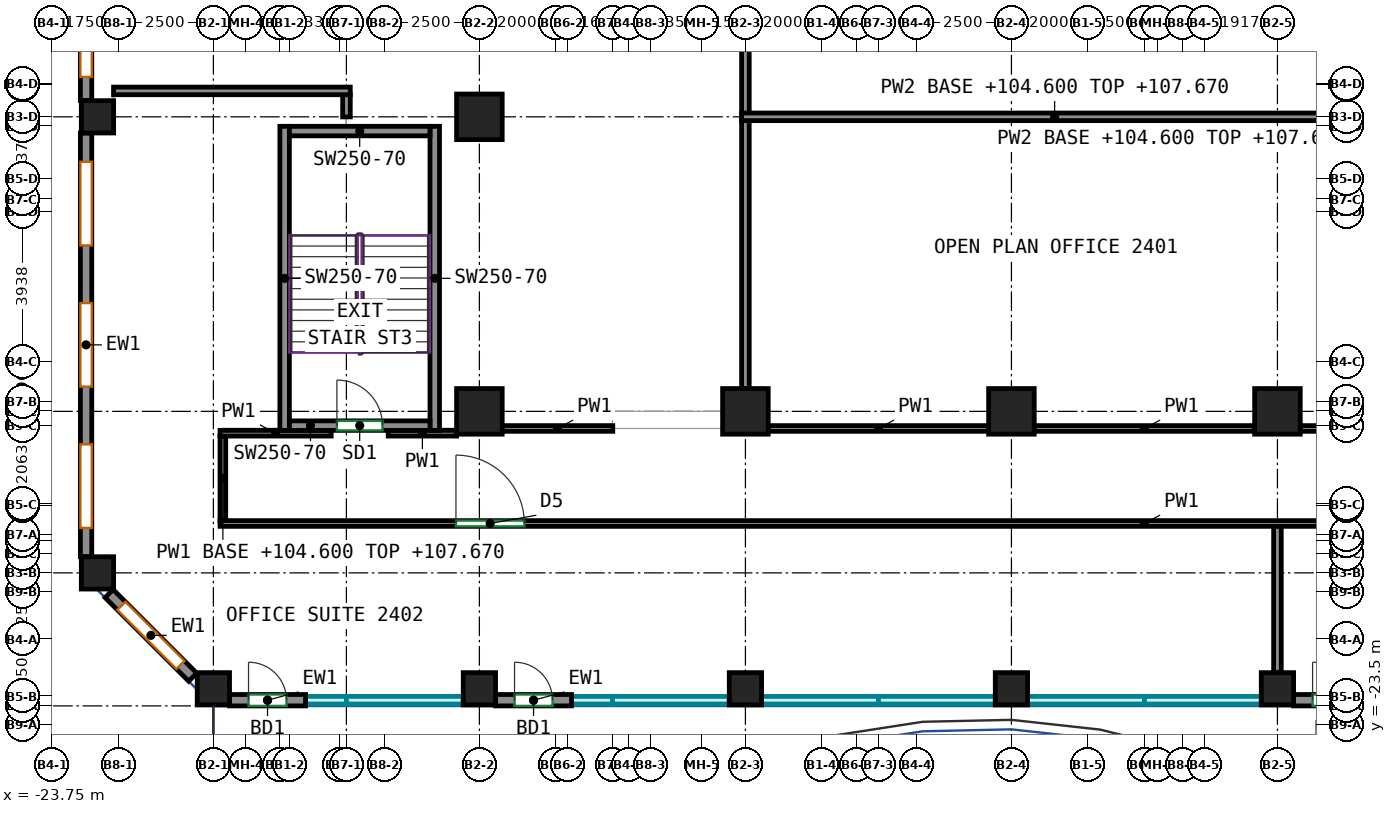
"""IFC4 building model, lengths in metres.
Left out: names, types, materials, properties, quantities, classifications, styles, units other than length and angle.
Written with IfcOpenShell. Run it as: python <this file> out.ifc"""

import sys

from ifc_helpers import new_model, si_unit, direction, frame, frame_2d, origin, origin_2d, place, context, subcontext, project, spatial, rectangle, extrude, source, transform, mapped, element, fill, save


model = new_model("IFC4")
c1 = context("Model", 3, precision=1e-05, world=origin(), true_north=direction((0.0, 1.0)))
c2 = subcontext(c1, "Body", "Model", "MODEL_VIEW")
j1 = project(units=[si_unit("LENGTHUNIT", "METRE"), si_unit("PLANEANGLEUNIT", "RADIAN")], contexts=[c1])
p1 = place(None, origin())
s1 = spatial("IfcSite", under=j1, at=p1, CompositionType="ELEMENT")
p2 = place(p1, origin())
s2 = spatial("IfcBuilding", under=s1, at=p2, CompositionType="ELEMENT")
p3 = place(p2, frame((0.0, 0.0, 104.6)))
s3 = spatial("IfcBuildingStorey", under=s2, at=p3, CompositionType="ELEMENT", Elevation=104.6)
m1 = source(origin(), c2, "Body", "SweptSolid", [
    extrude(rectangle(XDim=0.85, YDim=0.85, at=origin_2d()), origin(), (0.0, 0.0, 1.0), 3.72),
])
for number, where, z_axis, x_axis in (
    (1, (-22.55, -19.5, 0.0), (0.0, 0.0, 1.0), (1.0, 0.0, 0.0)),
    (2, (-22.55, -7.5, 0.0), (0.0, 0.0, 1.0), (1.0, 0.0, 0.0)),
    (3, (-19.5, -22.55, 0.0), (0.0, 0.0, 1.0), (1.0, 0.0, 0.0)),
    (4, (-12.5, -22.55, 0.0), (0.0, 0.0, 1.0), (1.0, 0.0, 0.0)),
):
    element("IfcColumn", number, at=place(p3, frame(where, z_axis=z_axis, x_axis=x_axis)), inside=s3, PredefinedType="COLUMN", context=c2, shape_type="MappedRepresentation", body=[
        mapped(m1, transform((0.0, 0.0, 0.0))),
    ])
m2 = source(origin(), c2, "Body", "SweptSolid", [
    extrude(rectangle(XDim=1.2, YDim=1.2, at=origin_2d()), origin(), (0.0, 0.0, 1.0), 3.72),
])
for number, where, z_axis, x_axis in (
    (5, (-12.5, -15.25, 0.0), (0.0, 0.0, 1.0), (1.0, 0.0, 0.0)),
    (6, (-12.5, -7.5, 0.0), (0.0, 0.0, 1.0), (1.0, 0.0, 0.0)),
):
    element("IfcColumn", number, at=place(p3, frame(where, z_axis=z_axis, x_axis=x_axis)), inside=s3, PredefinedType="COLUMN", context=c2, shape_type="MappedRepresentation", body=[
        mapped(m2, transform((0.0, 0.0, 0.0))),
    ])
p4 = place(p3, frame((-5.5, -22.55, 0.0), z_axis=(0.0, 0.0, 1.0), x_axis=(1.0, 0.0, 0.0)))
e7 = element("IfcColumn", 7, at=p4, inside=s3, PredefinedType="COLUMN", context=c2, shape_type="MappedRepresentation", body=[
    mapped(m1, transform((0.0, 0.0, 0.0))),
])
p5 = place(p3, frame((-5.5, -15.25, 0.0), z_axis=(0.0, 0.0, 1.0), x_axis=(1.0, 0.0, 0.0)))
e8 = element("IfcColumn", 8, at=p5, inside=s3, PredefinedType="COLUMN", context=c2, shape_type="MappedRepresentation", body=[
    mapped(m2, transform((0.0, 0.0, 0.0))),
])
p6 = place(p3, frame((1.5, -22.55, 0.0), z_axis=(0.0, 0.0, 1.0), x_axis=(1.0, 0.0, 0.0)))
e9 = element("IfcColumn", 9, at=p6, inside=s3, PredefinedType="COLUMN", context=c2, shape_type="MappedRepresentation", body=[
    mapped(m1, transform((0.0, 0.0, 0.0))),
])
p7 = place(p3, frame((1.5, -15.25, 0.0), z_axis=(0.0, 0.0, 1.0), x_axis=(1.0, 0.0, 0.0)))
e10 = element("IfcColumn", 10, at=p7, inside=s3, PredefinedType="COLUMN", context=c2, shape_type="MappedRepresentation", body=[
    mapped(m2, transform((0.0, 0.0, 0.0))),
])
p8 = place(p3, frame((8.5, -22.55, 0.0), z_axis=(0.0, 0.0, 1.0), x_axis=(1.0, 0.0, 0.0)))
e11 = element("IfcColumn", 11, at=p8, inside=s3, PredefinedType="COLUMN", context=c2, shape_type="MappedRepresentation", body=[
    mapped(m1, transform((0.0, 0.0, 0.0))),
])
p9 = place(p3, frame((8.5, -15.25, 0.0), z_axis=(0.0, 0.0, 1.0), x_axis=(1.0, 0.0, 0.0)))
e12 = element("IfcColumn", 12, at=p9, inside=s3, PredefinedType="COLUMN", context=c2, shape_type="MappedRepresentation", body=[
    mapped(m2, transform((0.0, 0.0, 0.0))),
])
m3 = source(origin(), c2, "Body", "SweptSolid", [
    extrude(rectangle(XDim=8.0, YDim=0.25, at=frame_2d((4.0, 0.0))), origin(), (0.0, 0.0, 1.0), 3.72),
])
for number, where, z_axis, x_axis in (
    (13, (-17.625, -15.75, 0.0), (0.0, 0.0, 1.0), (0.0, 1.0, 0.0)),
    (14, (-13.675, -15.75, 0.0), (0.0, 0.0, 1.0), (0.0, 1.0, 0.0)),
):
    element("IfcWall", number, at=place(p3, frame(where, z_axis=z_axis, x_axis=x_axis)), inside=s3, PredefinedType="SHEAR", context=c2, shape_type="MappedRepresentation", body=[
        mapped(m3, transform((0.0, 0.0, 0.0))),
    ])
m4 = source(origin(), c2, "Body", "SweptSolid", [
    extrude(rectangle(XDim=3.7, YDim=0.25, at=frame_2d((1.85, 0.0))), origin(), (0.0, 0.0, 1.0), 3.72),
])
p10 = place(p3, frame((-17.5, -15.625, 0.0), z_axis=(0.0, 0.0, 1.0), x_axis=(1.0, 0.0, 0.0)))
e15 = element("IfcWall", 15, at=p10, inside=s3, PredefinedType="SHEAR", context=c2, shape_type="MappedRepresentation", body=[
    mapped(m4, transform((0.0, 0.0, 0.0))),
])
p11 = place(p10, frame((1.25, 0.0, 0.0)))
e16 = element("IfcOpeningElement", 16, at=p11, cuts=e15, PredefinedType="OPENING", context=c2, shape_type="SweptSolid", body=[
    extrude(rectangle(XDim=1.2, YDim=2.1, at=frame_2d((0.6, 1.05))), frame((0.0, 0.135, 0.0), z_axis=(0.0, -1.0, 0.0), x_axis=(1.0, 0.0, 0.0)), (0.0, 0.0, 1.0), 0.27),
])
p12 = place(p3, frame((-17.5, -7.875, 0.0), z_axis=(0.0, 0.0, 1.0), x_axis=(1.0, 0.0, 0.0)))
e17 = element("IfcWall", 17, at=p12, inside=s3, PredefinedType="SHEAR", context=c2, shape_type="MappedRepresentation", body=[
    mapped(m4, transform((0.0, 0.0, 0.0))),
])
m5 = source(origin(), c2, "Body", "SweptSolid", [
    extrude(rectangle(XDim=2.0, YDim=0.3, at=frame_2d((1.0, 0.0))), origin(), (0.0, 0.0, 1.0), 3.72),
])
p13 = place(p3, frame((-19.075, -22.85, 0.0), z_axis=(0.0, 0.0, 1.0), x_axis=(1.0, 0.0, 0.0)))
e18 = element("IfcWall", 18, at=p13, inside=s3, PredefinedType="SOLIDWALL", context=c2, shape_type="MappedRepresentation", body=[
    mapped(m5, transform((0.0, 0.0, 0.0))),
])
p14 = place(p13, frame((0.5, 0.0, 0.0)))
e19 = element("IfcOpeningElement", 19, at=p14, cuts=e18, PredefinedType="OPENING", context=c2, shape_type="SweptSolid", body=[
    extrude(rectangle(XDim=1.0, YDim=2.1, at=frame_2d((0.5, 1.05))), frame((0.0, 0.16, 0.0), z_axis=(0.0, -1.0, 0.0), x_axis=(1.0, 0.0, 0.0)), (0.0, 0.0, 1.0), 0.32),
])
p15 = place(p3, frame((-12.075, -22.85, 0.0), z_axis=(0.0, 0.0, 1.0), x_axis=(1.0, 0.0, 0.0)))
e20 = element("IfcWall", 20, at=p15, inside=s3, PredefinedType="SOLIDWALL", context=c2, shape_type="MappedRepresentation", body=[
    mapped(m5, transform((0.0, 0.0, 0.0))),
])
p16 = place(p15, frame((0.5, 0.0, 0.0)))
e21 = element("IfcOpeningElement", 21, at=p16, cuts=e20, PredefinedType="OPENING", context=c2, shape_type="SweptSolid", body=[
    extrude(rectangle(XDim=1.0, YDim=2.1, at=frame_2d((0.5, 1.05))), frame((0.0, 0.16, 0.0), z_axis=(0.0, -1.0, 0.0), x_axis=(1.0, 0.0, 0.0)), (0.0, 0.0, 1.0), 0.32),
])
p17 = place(p3, frame((8.925, -22.85, 0.0), z_axis=(0.0, 0.0, 1.0), x_axis=(1.0, 0.0, 0.0)))
e22 = element("IfcWall", 22, at=p17, inside=s3, PredefinedType="SOLIDWALL", context=c2, shape_type="MappedRepresentation", body=[
    mapped(m5, transform((0.0, 0.0, 0.0))),
])
p18 = place(p17, frame((0.5, 0.0, 0.0)))
e23 = element("IfcOpeningElement", 23, at=p18, cuts=e22, PredefinedType="OPENING", context=c2, shape_type="SweptSolid", body=[
    extrude(rectangle(XDim=1.0, YDim=2.1, at=frame_2d((0.5, 1.05))), frame((0.0, 0.16, 0.0), z_axis=(0.0, -1.0, 0.0), x_axis=(1.0, 0.0, 0.0)), (0.0, 0.0, 1.0), 0.32),
])
m6 = source(origin(), c2, "Body", "SweptSolid", [
    extrude(rectangle(XDim=6.9, YDim=0.3, at=frame_2d((3.45, 0.0))), origin(), (0.0, 0.0, 1.0), 3.72),
])
p19 = place(p3, frame((-22.85, -0.175, 0.0), z_axis=(0.0, 0.0, 1.0), x_axis=(0.0, -1.0, 0.0)))
e24 = element("IfcWall", 24, at=p19, inside=s3, PredefinedType="SOLIDWALL", context=c2, shape_type="MappedRepresentation", body=[
    mapped(m6, transform((0.0, 0.0, 0.0))),
])
p20 = place(p19, frame((0.625, 0.0, 0.7)))
e25 = element("IfcOpeningElement", 25, at=p20, cuts=e24, PredefinedType="OPENING", context=c2, shape_type="SweptSolid", body=[
    extrude(rectangle(XDim=2.2, YDim=2.25, at=frame_2d((1.1, 1.125))), frame((0.0, 0.16, 0.0), z_axis=(0.0, -1.0, 0.0), x_axis=(1.0, 0.0, 0.0)), (0.0, 0.0, 1.0), 0.32),
])
p21 = place(p19, frame((4.075, 0.0, 0.7)))
e26 = element("IfcOpeningElement", 26, at=p21, cuts=e24, PredefinedType="OPENING", context=c2, shape_type="SweptSolid", body=[
    extrude(rectangle(XDim=2.2, YDim=2.25, at=frame_2d((1.1, 1.125))), frame((0.0, 0.16, 0.0), z_axis=(0.0, -1.0, 0.0), x_axis=(1.0, 0.0, 0.0)), (0.0, 0.0, 1.0), 0.32),
])
m7 = source(origin(), c2, "Body", "SweptSolid", [
    extrude(rectangle(XDim=11.15, YDim=0.3, at=frame_2d((5.575, 0.0))), origin(), (0.0, 0.0, 1.0), 3.72),
])
p22 = place(p3, frame((-22.85, -7.925, 0.0), z_axis=(0.0, 0.0, 1.0), x_axis=(0.0, -1.0, 0.0)))
e27 = element("IfcWall", 27, at=p22, inside=s3, PredefinedType="SOLIDWALL", context=c2, shape_type="MappedRepresentation", body=[
    mapped(m7, transform((0.0, 0.0, 0.0))),
])
p23 = place(p22, frame((0.758, 0.0, 0.7)))
e28 = element("IfcOpeningElement", 28, at=p23, cuts=e27, PredefinedType="OPENING", context=c2, shape_type="SweptSolid", body=[
    extrude(rectangle(XDim=2.2, YDim=2.25, at=frame_2d((1.1, 1.125))), frame((0.0, 0.16, 0.0), z_axis=(0.0, -1.0, 0.0), x_axis=(1.0, 0.0, 0.0)), (0.0, 0.0, 1.0), 0.32),
])
p24 = place(p22, frame((4.475, 0.0, 0.7)))
e29 = element("IfcOpeningElement", 29, at=p24, cuts=e27, PredefinedType="OPENING", context=c2, shape_type="SweptSolid", body=[
    extrude(rectangle(XDim=2.2, YDim=2.25, at=frame_2d((1.1, 1.125))), frame((0.0, 0.16, 0.0), z_axis=(0.0, -1.0, 0.0), x_axis=(1.0, 0.0, 0.0)), (0.0, 0.0, 1.0), 0.32),
])
p25 = place(p22, frame((8.192, 0.0, 0.7)))
e30 = element("IfcOpeningElement", 30, at=p25, cuts=e27, PredefinedType="OPENING", context=c2, shape_type="SweptSolid", body=[
    extrude(rectangle(XDim=2.2, YDim=2.25, at=frame_2d((1.1, 1.125))), frame((0.0, 0.16, 0.0), z_axis=(0.0, -1.0, 0.0), x_axis=(1.0, 0.0, 0.0)), (0.0, 0.0, 1.0), 0.32),
])
m8 = source(origin(), c2, "Body", "SweptSolid", [
    extrude(rectangle(XDim=3.111, YDim=0.3, at=frame_2d((1.556, 0.0))), origin(), (0.0, 0.0, 1.0), 3.72),
])
p26 = place(p3, frame((-22.244, -20.044, 0.0), z_axis=(0.0, 0.0, 1.0), x_axis=(0.707106781187, -0.707106781187, 0.0)))
e31 = element("IfcWall", 31, at=p26, inside=s3, PredefinedType="SOLIDWALL", context=c2, shape_type="MappedRepresentation", body=[
    mapped(m8, transform((0.0, 0.0, 0.0))),
])
p27 = place(p26, frame((0.456, 0.0, 0.7)))
e32 = element("IfcOpeningElement", 32, at=p27, cuts=e31, PredefinedType="OPENING", context=c2, shape_type="SweptSolid", body=[
    extrude(rectangle(XDim=2.2, YDim=2.25, at=frame_2d((1.1, 1.125))), frame((0.0, 0.16, 0.0), z_axis=(0.0, -1.0, 0.0), x_axis=(1.0, 0.0, 0.0)), (0.0, 0.0, 1.0), 0.32),
])
p28 = place(p3, frame((-14.9, -15.825, 0.0), z_axis=(0.0, 0.0, 1.0), x_axis=(1.0, 0.0, 0.0)))
e33 = element("IfcWall", 33, at=p28, inside=s3, PredefinedType="PARTITIONING", context=c2, shape_type="SweptSolid", body=[
    extrude(rectangle(XDim=1.8, YDim=0.15, at=frame_2d((0.9, 0.0))), origin(), (0.0, 0.0, 1.0), 3.72),
])
p29 = place(p3, frame((-11.9, -15.7, 0.0), z_axis=(0.0, 0.0, 1.0), x_axis=(1.0, 0.0, 0.0)))
e34 = element("IfcWall", 34, at=p29, inside=s3, PredefinedType="PARTITIONING", context=c2, shape_type="SweptSolid", body=[
    extrude(rectangle(XDim=2.91, YDim=0.15, at=frame_2d((1.455, 0.0))), origin(), (0.0, 0.0, 1.0), 3.72),
])
p30 = place(p3, frame((-19.325, -18.2, 0.0), z_axis=(0.0, 0.0, 1.0), x_axis=(1.0, 0.0, 0.0)))
e35 = element("IfcWall", 35, at=p30, inside=s3, PredefinedType="PARTITIONING", context=c2, shape_type="SweptSolid", body=[
    extrude(rectangle(XDim=48.65, YDim=0.15, at=frame_2d((24.325, 0.0))), origin(), (0.0, 0.0, 1.0), 3.72),
])
p31 = place(p30, frame((6.208, 0.0, 0.0)))
e36 = element("IfcOpeningElement", 36, at=p31, cuts=e35, PredefinedType="OPENING", context=c2, shape_type="SweptSolid", body=[
    extrude(rectangle(XDim=1.8, YDim=2.1, at=frame_2d((0.9, 1.05))), frame((0.0, 0.085, 0.0), z_axis=(0.0, -1.0, 0.0), x_axis=(1.0, 0.0, 0.0)), (0.0, 0.0, 1.0), 0.17),
])
p32 = place(p30, frame((29.32, 0.0, 0.0)))
e37 = element("IfcOpeningElement", 37, at=p32, cuts=e35, PredefinedType="OPENING", context=c2, shape_type="SweptSolid", body=[
    extrude(rectangle(XDim=0.9, YDim=2.1, at=frame_2d((0.45, 1.05))), frame((0.0, 0.085, 0.0), z_axis=(0.0, -1.0, 0.0), x_axis=(1.0, 0.0, 0.0)), (0.0, 0.0, 1.0), 0.17),
])
p33 = place(p30, frame((38.725, 0.0, 0.0)))
e38 = element("IfcOpeningElement", 38, at=p33, cuts=e35, PredefinedType="OPENING", context=c2, shape_type="SweptSolid", body=[
    extrude(rectangle(XDim=1.0, YDim=2.1, at=frame_2d((0.5, 1.05))), frame((0.0, 0.085, 0.0), z_axis=(0.0, -1.0, 0.0), x_axis=(1.0, 0.0, 0.0)), (0.0, 0.0, 1.0), 0.17),
])
p34 = place(p3, frame((-19.25, -15.9, 0.0), z_axis=(0.0, 0.0, 1.0), x_axis=(0.0, -1.0, 0.0)))
e39 = element("IfcWall", 39, at=p34, inside=s3, PredefinedType="PARTITIONING", context=c2, shape_type="SweptSolid", body=[
    extrude(rectangle(XDim=2.225, YDim=0.15, at=frame_2d((1.113, 0.0))), origin(), (0.0, 0.0, 1.0), 3.07),
])
p35 = place(p3, frame((-19.325, -15.825, 0.0), z_axis=(0.0, 0.0, 1.0), x_axis=(1.0, 0.0, 0.0)))
e40 = element("IfcWall", 40, at=p35, inside=s3, PredefinedType="PARTITIONING", context=c2, shape_type="SweptSolid", body=[
    extrude(rectangle(XDim=2.925, YDim=0.15, at=frame_2d((1.462, 0.0))), origin(), (0.0, 0.0, 1.0), 3.72),
])
for number, where, z_axis, x_axis in (
    (41, (-4.9, -15.7, 0.0), (0.0, 0.0, 1.0), (1.0, 0.0, 0.0)),
    (42, (2.1, -15.7, 0.0), (0.0, 0.0, 1.0), (1.0, 0.0, 0.0)),
):
    element("IfcWall", number, at=place(p3, frame(where, z_axis=z_axis, x_axis=x_axis)), inside=s3, PredefinedType="PARTITIONING", context=c2, shape_type="SweptSolid", body=[
        extrude(rectangle(XDim=5.8, YDim=0.15, at=frame_2d((2.9, 0.0))), origin(), (0.0, 0.0, 1.0), 3.72),
    ])
p36 = place(p3, frame((9.1, -15.7, 0.0), z_axis=(0.0, 0.0, 1.0), x_axis=(1.0, 0.0, 0.0)))
e43 = element("IfcWall", 43, at=p36, inside=s3, PredefinedType="PARTITIONING", context=c2, shape_type="SweptSolid", body=[
    extrude(rectangle(XDim=1.775, YDim=0.15, at=frame_2d((0.887, 0.0))), origin(), (0.0, 0.0, 1.0), 3.72),
])
p37 = place(p3, frame((-15.998, -6.918, 0.0), z_axis=(0.0, 0.0, 1.0), x_axis=(0.0, -1.0, 0.0)))
e44 = element("IfcWall", 44, at=p37, inside=s3, PredefinedType="PARTITIONING", context=c2, shape_type="SweptSolid", body=[
    extrude(rectangle(XDim=0.584, YDim=0.2, at=frame_2d((0.292, 0.0))), origin(), (0.0, 0.0, 1.0), 3.72),
])
p38 = place(p3, frame((-22.127, -6.818, 0.0), z_axis=(0.0, 0.0, 1.0), x_axis=(1.0, 0.0, 0.0)))
e45 = element("IfcWall", 45, at=p38, inside=s3, PredefinedType="PARTITIONING", context=c2, shape_type="SweptSolid", body=[
    extrude(rectangle(XDim=6.229, YDim=0.2, at=frame_2d((3.115, 0.0))), origin(), (0.0, 0.0, 1.0), 3.72),
])
p39 = place(p3, frame((-5.5, -14.65, 0.0), z_axis=(0.0, 0.0, 1.0), x_axis=(0.0, 1.0, 0.0)))
e46 = element("IfcWall", 46, at=p39, inside=s3, PredefinedType="PARTITIONING", context=c2, shape_type="SweptSolid", body=[
    extrude(rectangle(XDim=7.06, YDim=0.2, at=frame_2d((3.53, 0.0))), origin(), (0.0, 0.0, 1.0), 3.72),
])
p40 = place(p3, frame((-5.5, -7.41, 0.0), z_axis=(0.0, 0.0, 1.0), x_axis=(0.0, 1.0, 0.0)))
e47 = element("IfcWall", 47, at=p40, inside=s3, PredefinedType="PARTITIONING", context=c2, shape_type="SweptSolid", body=[
    extrude(rectangle(XDim=3.685, YDim=0.2, at=frame_2d((1.842, 0.0))), origin(), (0.0, 0.0, 1.0), 3.72),
])
p41 = place(p3, frame((8.5, -22.125, 0.0), z_axis=(0.0, 0.0, 1.0), x_axis=(0.0, 1.0, 0.0)))
e48 = element("IfcWall", 48, at=p41, inside=s3, PredefinedType="PARTITIONING", context=c2, shape_type="SweptSolid", body=[
    extrude(rectangle(XDim=3.849, YDim=0.2, at=frame_2d((1.925, 0.0))), origin(), (0.0, 0.0, 1.0), 3.72),
])
p42 = place(p3, frame((-5.6, -7.5, 0.0), z_axis=(0.0, 0.0, 1.0), x_axis=(1.0, 0.0, 0.0)))
e49 = element("IfcWall", 49, at=p42, inside=s3, PredefinedType="PARTITIONING", context=c2, shape_type="SweptSolid", body=[
    extrude(rectangle(XDim=16.474, YDim=0.2, at=frame_2d((8.237, 0.0))), origin(), (0.0, 0.0, 1.0), 3.07),
])
p43 = place(p14, origin())
e50 = element("IfcDoor", 50, at=p43, inside=s3, OperationType="SINGLE_SWING_LEFT", PredefinedType="DOOR", context=c2, shape_type="SweptSolid", body=[
    extrude(rectangle(XDim=1.0, YDim=2.1, at=frame_2d((0.5, 1.05))), frame((0.0, 0.025, 0.0), z_axis=(0.0, -1.0, 0.0), x_axis=(1.0, 0.0, 0.0)), (0.0, 0.0, 1.0), 0.05),
])
fill(e19, e50)
p44 = place(p16, origin())
e51 = element("IfcDoor", 51, at=p44, inside=s3, OperationType="SINGLE_SWING_LEFT", PredefinedType="DOOR", context=c2, shape_type="SweptSolid", body=[
    extrude(rectangle(XDim=1.0, YDim=2.1, at=frame_2d((0.5, 1.05))), frame((0.0, 0.025, 0.0), z_axis=(0.0, -1.0, 0.0), x_axis=(1.0, 0.0, 0.0)), (0.0, 0.0, 1.0), 0.05),
])
fill(e21, e51)
p45 = place(p18, origin())
e52 = element("IfcDoor", 52, at=p45, inside=s3, OperationType="SINGLE_SWING_LEFT", PredefinedType="DOOR", context=c2, shape_type="SweptSolid", body=[
    extrude(rectangle(XDim=1.0, YDim=2.1, at=frame_2d((0.5, 1.05))), frame((0.0, 0.025, 0.0), z_axis=(0.0, -1.0, 0.0), x_axis=(1.0, 0.0, 0.0)), (0.0, 0.0, 1.0), 0.05),
])
fill(e23, e52)
p46 = place(p21, origin())
e53 = element("IfcWindow", 53, at=p46, inside=s3, PartitioningType="SINGLE_PANEL", PredefinedType="WINDOW", context=c2, shape_type="SweptSolid", body=[
    extrude(rectangle(XDim=2.2, YDim=2.25, at=frame_2d((1.1, 1.125))), frame((0.0, 0.03, 0.0), z_axis=(0.0, -1.0, 0.0), x_axis=(1.0, 0.0, 0.0)), (0.0, 0.0, 1.0), 0.06),
])
fill(e26, e53)
p47 = place(p23, origin())
e54 = element("IfcWindow", 54, at=p47, inside=s3, PartitioningType="SINGLE_PANEL", PredefinedType="WINDOW", context=c2, shape_type="SweptSolid", body=[
    extrude(rectangle(XDim=2.2, YDim=2.25, at=frame_2d((1.1, 1.125))), frame((0.0, 0.03, 0.0), z_axis=(0.0, -1.0, 0.0), x_axis=(1.0, 0.0, 0.0)), (0.0, 0.0, 1.0), 0.06),
])
fill(e28, e54)
p48 = place(p24, origin())
e55 = element("IfcWindow", 55, at=p48, inside=s3, PartitioningType="SINGLE_PANEL", PredefinedType="WINDOW", context=c2, shape_type="SweptSolid", body=[
    extrude(rectangle(XDim=2.2, YDim=2.25, at=frame_2d((1.1, 1.125))), frame((0.0, 0.03, 0.0), z_axis=(0.0, -1.0, 0.0), x_axis=(1.0, 0.0, 0.0)), (0.0, 0.0, 1.0), 0.06),
])
fill(e29, e55)
p49 = place(p25, origin())
e56 = element("IfcWindow", 56, at=p49, inside=s3, PartitioningType="SINGLE_PANEL", PredefinedType="WINDOW", context=c2, shape_type="SweptSolid", body=[
    extrude(rectangle(XDim=2.2, YDim=2.25, at=frame_2d((1.1, 1.125))), frame((0.0, 0.03, 0.0), z_axis=(0.0, -1.0, 0.0), x_axis=(1.0, 0.0, 0.0)), (0.0, 0.0, 1.0), 0.06),
])
fill(e30, e56)
p50 = place(p27, origin())
e57 = element("IfcWindow", 57, at=p50, inside=s3, PartitioningType="SINGLE_PANEL", PredefinedType="WINDOW", context=c2, shape_type="SweptSolid", body=[
    extrude(rectangle(XDim=2.2, YDim=2.25, at=frame_2d((1.1, 1.125))), frame((0.0, 0.03, 0.0), z_axis=(0.0, -1.0, 0.0), x_axis=(1.0, 0.0, 0.0)), (0.0, 0.0, 1.0), 0.06),
])
fill(e32, e57)
p51 = place(p11, origin())
e58 = element("IfcDoor", 58, at=p51, inside=s3, OperationType="DOUBLE_DOOR_SINGLE_SWING", PredefinedType="DOOR", context=c2, shape_type="SweptSolid", body=[
    extrude(rectangle(XDim=1.2, YDim=2.1, at=frame_2d((0.6, 1.05))), frame((0.0, 0.025, 0.0), z_axis=(0.0, -1.0, 0.0), x_axis=(1.0, 0.0, 0.0)), (0.0, 0.0, 1.0), 0.05),
])
fill(e16, e58)
p52 = place(p31, origin())
e59 = element("IfcDoor", 59, at=p52, inside=s3, OperationType="DOUBLE_DOOR_SINGLE_SWING", PredefinedType="DOOR", context=c2, shape_type="SweptSolid", body=[
    extrude(rectangle(XDim=1.8, YDim=2.1, at=frame_2d((0.9, 1.05))), frame((0.0, 0.025, 0.0), z_axis=(0.0, -1.0, 0.0), x_axis=(1.0, 0.0, 0.0)), (0.0, 0.0, 1.0), 0.05),
])
fill(e36, e59)
save(model, sys.argv[1])
